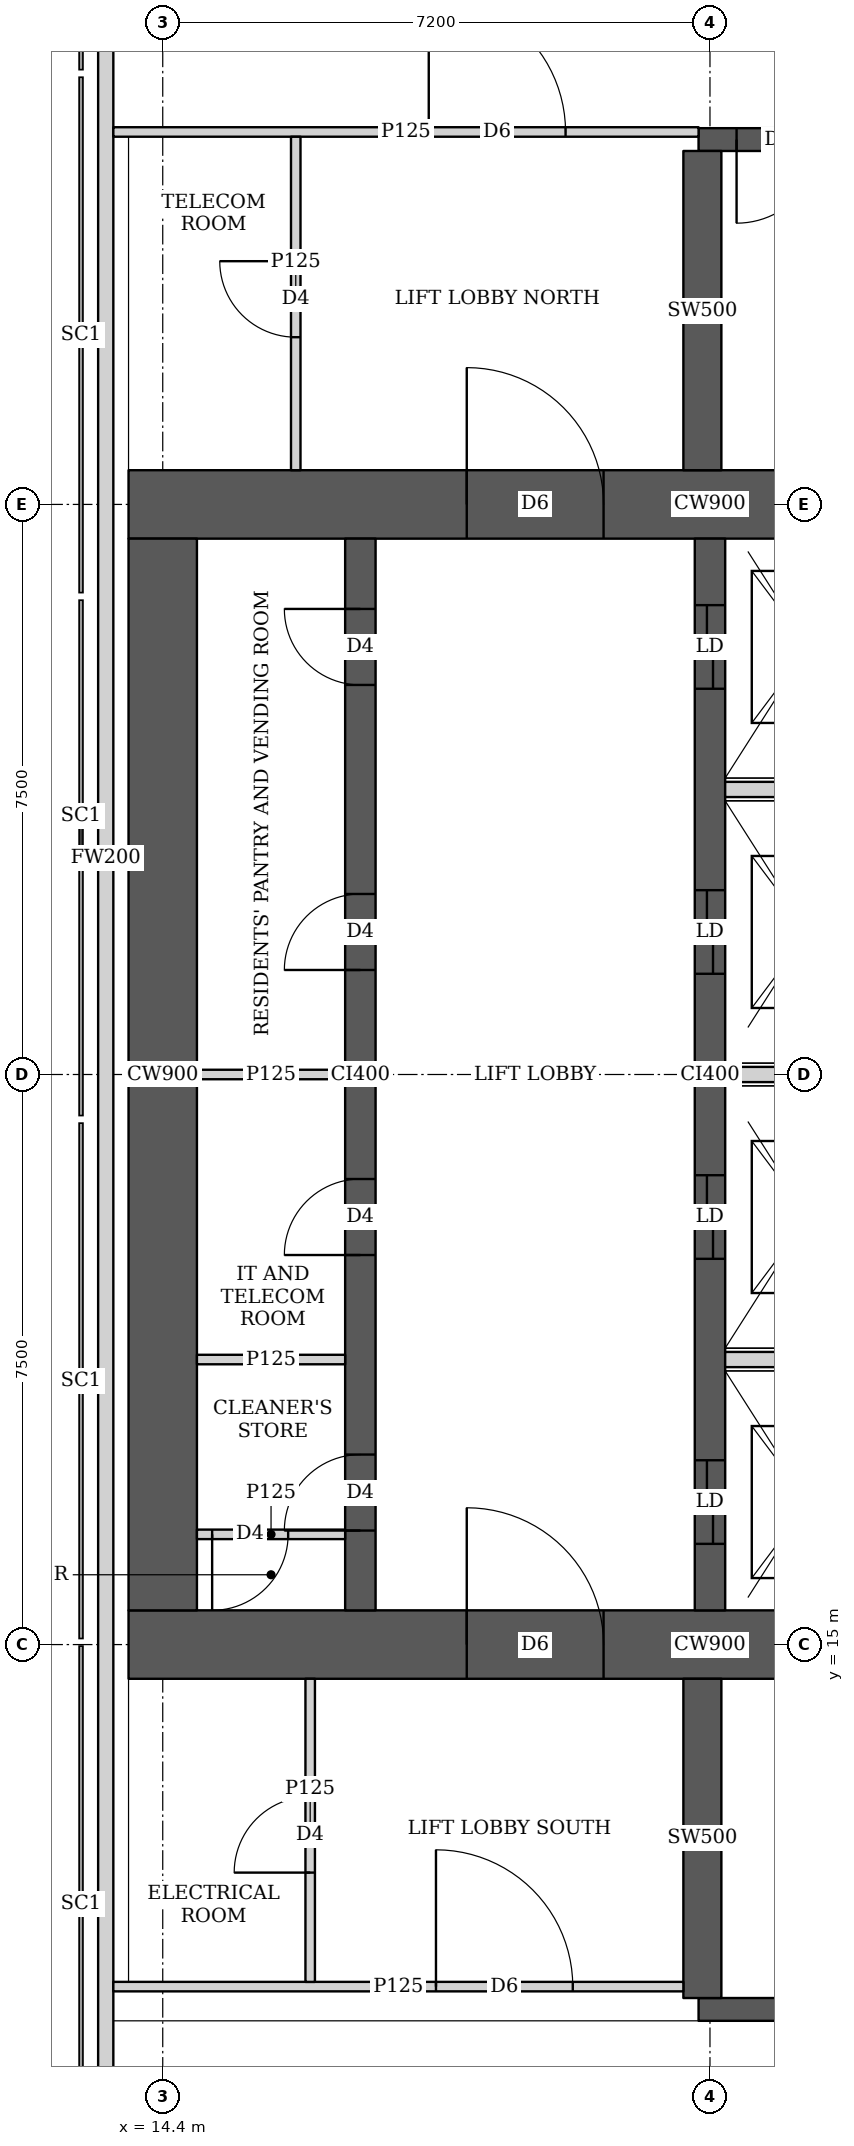
"""IFC4 building model, lengths in metres.
Left out: names, types, materials, properties, quantities, classifications, styles, units other than length and angle.
Written with IfcOpenShell. Run it as: python <this file> out.ifc"""

import sys

from ifc_helpers import new_model, si_unit, direction, frame, frame_2d, origin, place, context, subcontext, project, spatial, rectangle, extrude, element, fill, save


model = new_model("IFC4")
c1 = context("Model", 3, precision=1e-05, world=origin(), true_north=direction((0.0, 1.0)))
c2 = subcontext(c1, "Body", "Model", "MODEL_VIEW")
j1 = project(units=[si_unit("LENGTHUNIT", "METRE"), si_unit("PLANEANGLEUNIT", "RADIAN")], contexts=[c1])
p1 = place(None, origin())
s1 = spatial("IfcSite", under=j1, at=p1, CompositionType="ELEMENT")
p2 = place(p1, origin())
s2 = spatial("IfcBuilding", under=s1, at=p2, CompositionType="ELEMENT")
p3 = place(p2, frame((0.0, 0.0, 251.6)))
s3 = spatial("IfcBuildingStorey", under=s2, at=p3, CompositionType="ELEMENT", Elevation=251.6)
p4 = place(p3, frame((13.95, 15.0, 0.0), z_axis=(0.0, 0.0, 1.0), x_axis=(1.0, 0.0, 0.0)))
e1 = element("IfcWall", 1, at=p4, inside=s3, PredefinedType="SHEAR", context=c2, shape_type="SweptSolid", body=[
    extrude(rectangle(XDim=15.3, YDim=0.9, at=frame_2d((7.65, 0.0))), origin(), (0.0, 0.0, 1.0), 3.75),
])
p5 = place(p4, frame((4.45, 0.0, 0.0)))
e2 = element("IfcOpeningElement", 2, at=p5, cuts=e1, PredefinedType="OPENING", context=c2, shape_type="SweptSolid", body=[
    extrude(rectangle(XDim=1.8, YDim=2.1, at=frame_2d((0.9, 1.05))), frame((0.0, 0.46, 0.0), z_axis=(0.0, -1.0, 0.0), x_axis=(1.0, 0.0, 0.0)), (0.0, 0.0, 1.0), 0.92),
])
p6 = place(p4, frame((10.7, 0.0, 0.0)))
e3 = element("IfcOpeningElement", 3, at=p6, cuts=e1, PredefinedType="OPENING", context=c2, shape_type="SweptSolid", body=[
    extrude(rectangle(XDim=1.1, YDim=2.1, at=frame_2d((0.55, 1.05))), frame((0.0, 0.46, 0.0), z_axis=(0.0, -1.0, 0.0), x_axis=(1.0, 0.0, 0.0)), (0.0, 0.0, 1.0), 0.92),
])
p7 = place(p3, frame((13.95, 30.0, 0.0), z_axis=(0.0, 0.0, 1.0), x_axis=(1.0, 0.0, 0.0)))
e4 = element("IfcWall", 4, at=p7, inside=s3, PredefinedType="SHEAR", context=c2, shape_type="SweptSolid", body=[
    extrude(rectangle(XDim=15.3, YDim=0.9, at=frame_2d((7.65, 0.0))), origin(), (0.0, 0.0, 1.0), 3.75),
])
p8 = place(p7, frame((4.45, 0.0, 0.0)))
e5 = element("IfcOpeningElement", 5, at=p8, cuts=e4, PredefinedType="OPENING", context=c2, shape_type="SweptSolid", body=[
    extrude(rectangle(XDim=1.8, YDim=2.1, at=frame_2d((0.9, 1.05))), frame((0.0, 0.46, 0.0), z_axis=(0.0, -1.0, 0.0), x_axis=(1.0, 0.0, 0.0)), (0.0, 0.0, 1.0), 0.92),
])
p9 = place(p7, frame((10.7, 0.0, 0.0)))
e6 = element("IfcOpeningElement", 6, at=p9, cuts=e4, PredefinedType="OPENING", context=c2, shape_type="SweptSolid", body=[
    extrude(rectangle(XDim=1.1, YDim=2.1, at=frame_2d((0.55, 1.05))), frame((0.0, 0.46, 0.0), z_axis=(0.0, -1.0, 0.0), x_axis=(1.0, 0.0, 0.0)), (0.0, 0.0, 1.0), 0.92),
])
p10 = place(p3, frame((14.4, 15.45, 0.0), z_axis=(0.0, 0.0, 1.0), x_axis=(0.0, 1.0, 0.0)))
e7 = element("IfcWall", 7, at=p10, inside=s3, PredefinedType="SHEAR", context=c2, shape_type="SweptSolid", body=[
    extrude(rectangle(XDim=14.1, YDim=0.9, at=frame_2d((7.05, 0.0))), origin(), (0.0, 0.0, 1.0), 3.75),
])
p11 = place(p3, frame((17.0, 15.45, 0.0), z_axis=(0.0, 0.0, 1.0), x_axis=(0.0, 1.0, 0.0)))
e8 = element("IfcWall", 8, at=p11, inside=s3, PredefinedType="SHEAR", context=c2, shape_type="SweptSolid", body=[
    extrude(rectangle(XDim=14.1, YDim=0.4, at=frame_2d((7.05, 0.0))), origin(), (0.0, 0.0, 1.0), 3.75),
])
p12 = place(p11, frame((1.05, 0.0, 0.0)))
e9 = element("IfcOpeningElement", 9, at=p12, cuts=e8, PredefinedType="OPENING", context=c2, shape_type="SweptSolid", body=[
    extrude(rectangle(XDim=1.0, YDim=2.1, at=frame_2d((0.5, 1.05))), frame((0.0, 0.21, 0.0), z_axis=(0.0, -1.0, 0.0), x_axis=(1.0, 0.0, 0.0)), (0.0, 0.0, 1.0), 0.42),
])
p13 = place(p11, frame((4.675, 0.0, 0.0)))
e10 = element("IfcOpeningElement", 10, at=p13, cuts=e8, PredefinedType="OPENING", context=c2, shape_type="SweptSolid", body=[
    extrude(rectangle(XDim=1.0, YDim=2.1, at=frame_2d((0.5, 1.05))), frame((0.0, 0.21, 0.0), z_axis=(0.0, -1.0, 0.0), x_axis=(1.0, 0.0, 0.0)), (0.0, 0.0, 1.0), 0.42),
])
p14 = place(p11, frame((8.425, 0.0, 0.0)))
e11 = element("IfcOpeningElement", 11, at=p14, cuts=e8, PredefinedType="OPENING", context=c2, shape_type="SweptSolid", body=[
    extrude(rectangle(XDim=1.0, YDim=2.1, at=frame_2d((0.5, 1.05))), frame((0.0, 0.21, 0.0), z_axis=(0.0, -1.0, 0.0), x_axis=(1.0, 0.0, 0.0)), (0.0, 0.0, 1.0), 0.42),
])
p15 = place(p11, frame((12.175, 0.0, 0.0)))
e12 = element("IfcOpeningElement", 12, at=p15, cuts=e8, PredefinedType="OPENING", context=c2, shape_type="SweptSolid", body=[
    extrude(rectangle(XDim=1.0, YDim=2.1, at=frame_2d((0.5, 1.05))), frame((0.0, 0.21, 0.0), z_axis=(0.0, -1.0, 0.0), x_axis=(1.0, 0.0, 0.0)), (0.0, 0.0, 1.0), 0.42),
])
p16 = place(p3, frame((21.6, 15.45, 0.0), z_axis=(0.0, 0.0, 1.0), x_axis=(0.0, 1.0, 0.0)))
e13 = element("IfcWall", 13, at=p16, inside=s3, PredefinedType="SHEAR", context=c2, shape_type="SweptSolid", body=[
    extrude(rectangle(XDim=14.1, YDim=0.4, at=frame_2d((7.05, 0.0))), origin(), (0.0, 0.0, 1.0), 3.75),
])
p17 = place(p16, frame((0.875, 0.0, 0.0)))
e14 = element("IfcOpeningElement", 14, at=p17, cuts=e13, PredefinedType="OPENING", context=c2, shape_type="SweptSolid", body=[
    extrude(rectangle(XDim=1.1, YDim=2.1, at=frame_2d((0.55, 1.05))), frame((0.0, 0.21, 0.0), z_axis=(0.0, -1.0, 0.0), x_axis=(1.0, 0.0, 0.0)), (0.0, 0.0, 1.0), 0.42),
])
p18 = place(p16, frame((4.625, 0.0, 0.0)))
e15 = element("IfcOpeningElement", 15, at=p18, cuts=e13, PredefinedType="OPENING", context=c2, shape_type="SweptSolid", body=[
    extrude(rectangle(XDim=1.1, YDim=2.1, at=frame_2d((0.55, 1.05))), frame((0.0, 0.21, 0.0), z_axis=(0.0, -1.0, 0.0), x_axis=(1.0, 0.0, 0.0)), (0.0, 0.0, 1.0), 0.42),
])
p19 = place(p16, frame((8.375, 0.0, 0.0)))
e16 = element("IfcOpeningElement", 16, at=p19, cuts=e13, PredefinedType="OPENING", context=c2, shape_type="SweptSolid", body=[
    extrude(rectangle(XDim=1.1, YDim=2.1, at=frame_2d((0.55, 1.05))), frame((0.0, 0.21, 0.0), z_axis=(0.0, -1.0, 0.0), x_axis=(1.0, 0.0, 0.0)), (0.0, 0.0, 1.0), 0.42),
])
p20 = place(p16, frame((12.125, 0.0, 0.0)))
e17 = element("IfcOpeningElement", 17, at=p20, cuts=e13, PredefinedType="OPENING", context=c2, shape_type="SweptSolid", body=[
    extrude(rectangle(XDim=1.1, YDim=2.1, at=frame_2d((0.55, 1.05))), frame((0.0, 0.21, 0.0), z_axis=(0.0, -1.0, 0.0), x_axis=(1.0, 0.0, 0.0)), (0.0, 0.0, 1.0), 0.42),
])
p21 = place(p3, frame((21.45, 10.2, 0.0), z_axis=(0.0, 0.0, 1.0), x_axis=(1.0, 0.0, 0.0)))
e18 = element("IfcWall", 18, at=p21, inside=s3, PredefinedType="SHEAR", context=c2, shape_type="SweptSolid", body=[
    extrude(rectangle(XDim=7.5, YDim=0.3, at=frame_2d((3.75, 0.0))), origin(), (0.0, 0.0, 1.0), 3.75),
])
p22 = place(p21, frame((1.2, 0.0, 0.0)))
e19 = element("IfcOpeningElement", 19, at=p22, cuts=e18, PredefinedType="OPENING", context=c2, shape_type="SweptSolid", body=[
    extrude(rectangle(XDim=1.1, YDim=2.1, at=frame_2d((0.55, 1.05))), frame((0.0, 0.16, 0.0), z_axis=(0.0, -1.0, 0.0), x_axis=(1.0, 0.0, 0.0)), (0.0, 0.0, 1.0), 0.32),
])
p23 = place(p3, frame((21.5, 10.35, 0.0), z_axis=(0.0, 0.0, 1.0), x_axis=(0.0, 1.0, 0.0)))
e20 = element("IfcWall", 20, at=p23, inside=s3, PredefinedType="SHEAR", context=c2, shape_type="SweptSolid", body=[
    extrude(rectangle(XDim=4.2, YDim=0.5, at=frame_2d((2.1, 0.0))), origin(), (0.0, 0.0, 1.0), 3.75),
])
p24 = place(p3, frame((21.45, 34.8, 0.0), z_axis=(0.0, 0.0, 1.0), x_axis=(1.0, 0.0, 0.0)))
e21 = element("IfcWall", 21, at=p24, inside=s3, PredefinedType="SHEAR", context=c2, shape_type="SweptSolid", body=[
    extrude(rectangle(XDim=7.5, YDim=0.3, at=frame_2d((3.75, 0.0))), origin(), (0.0, 0.0, 1.0), 3.75),
])
p25 = place(p24, frame((0.5, 0.0, 0.0)))
e22 = element("IfcOpeningElement", 22, at=p25, cuts=e21, PredefinedType="OPENING", context=c2, shape_type="SweptSolid", body=[
    extrude(rectangle(XDim=1.1, YDim=2.1, at=frame_2d((0.55, 1.05))), frame((0.0, 0.16, 0.0), z_axis=(0.0, -1.0, 0.0), x_axis=(1.0, 0.0, 0.0)), (0.0, 0.0, 1.0), 0.32),
])
p26 = place(p3, frame((21.5, 30.45, 0.0), z_axis=(0.0, 0.0, 1.0), x_axis=(0.0, 1.0, 0.0)))
e23 = element("IfcWall", 23, at=p26, inside=s3, PredefinedType="SHEAR", context=c2, shape_type="SweptSolid", body=[
    extrude(rectangle(XDim=4.2, YDim=0.5, at=frame_2d((2.1, 0.0))), origin(), (0.0, 0.0, 1.0), 3.75),
])
p27 = place(p3, frame((13.65, 43.037, 0.0), z_axis=(0.0, 0.0, 1.0), x_axis=(0.0, -1.0, 0.0)))
e24 = element("IfcWall", 24, at=p27, inside=s3, PredefinedType="SOLIDWALL", context=c2, shape_type="SweptSolid", body=[
    extrude(rectangle(XDim=35.374, YDim=0.2, at=frame_2d((17.687, 0.0))), origin(), (0.0, 0.0, 1.0), 3.5),
])
p28 = place(p27, frame((1.959, 0.0, 0.9)))
e25 = element("IfcOpeningElement", 25, at=p28, cuts=e24, PredefinedType="OPENING", context=c2, shape_type="SweptSolid", body=[
    extrude(rectangle(XDim=1.8, YDim=1.5, at=frame_2d((0.9, 0.75))), frame((0.0, 0.11, 0.0), z_axis=(0.0, -1.0, 0.0), x_axis=(1.0, 0.0, 0.0)), (0.0, 0.0, 1.0), 0.22),
])
p29 = place(p3, frame((13.75, 10.5, 0.0), z_axis=(0.0, 0.0, 1.0), x_axis=(1.0, 0.0, 0.0)))
e26 = element("IfcWall", 26, at=p29, inside=s3, PredefinedType="PARTITIONING", context=c2, shape_type="SweptSolid", body=[
    extrude(rectangle(XDim=7.5, YDim=0.125, at=frame_2d((3.75, 0.0))), origin(), (0.0, 0.0, 1.0), 3.5),
])
p30 = place(p29, frame((4.245, 0.0, 0.0)))
e27 = element("IfcOpeningElement", 27, at=p30, cuts=e26, PredefinedType="OPENING", context=c2, shape_type="SweptSolid", body=[
    extrude(rectangle(XDim=1.8, YDim=2.1, at=frame_2d((0.9, 1.05))), frame((0.0, 0.073, 0.0), z_axis=(0.0, -1.0, 0.0), x_axis=(1.0, 0.0, 0.0)), (0.0, 0.0, 1.0), 0.145),
])
p31 = place(p3, frame((13.75, 34.9, 0.0), z_axis=(0.0, 0.0, 1.0), x_axis=(1.0, 0.0, 0.0)))
e28 = element("IfcWall", 28, at=p31, inside=s3, PredefinedType="PARTITIONING", context=c2, shape_type="SweptSolid", body=[
    extrude(rectangle(XDim=7.7, YDim=0.125, at=frame_2d((3.85, 0.0))), origin(), (0.0, 0.0, 1.0), 3.5),
])
p32 = place(p31, frame((4.15, 0.0, 0.0)))
e29 = element("IfcOpeningElement", 29, at=p32, cuts=e28, PredefinedType="OPENING", context=c2, shape_type="SweptSolid", body=[
    extrude(rectangle(XDim=1.8, YDim=2.1, at=frame_2d((0.9, 1.05))), frame((0.0, 0.073, 0.0), z_axis=(0.0, -1.0, 0.0), x_axis=(1.0, 0.0, 0.0)), (0.0, 0.0, 1.0), 0.145),
])
p33 = place(p3, frame((16.34, 10.562, 0.0), z_axis=(0.0, 0.0, 1.0), x_axis=(0.0, 1.0, 0.0)))
e30 = element("IfcWall", 30, at=p33, inside=s3, PredefinedType="PARTITIONING", context=c2, shape_type="SweptSolid", body=[
    extrude(rectangle(XDim=3.988, YDim=0.125, at=frame_2d((1.994, 0.0))), origin(), (0.0, 0.0, 1.0), 3.5),
])
p34 = place(p33, frame((1.438, 0.0, 0.0)))
e31 = element("IfcOpeningElement", 31, at=p34, cuts=e30, PredefinedType="OPENING", context=c2, shape_type="SweptSolid", body=[
    extrude(rectangle(XDim=1.0, YDim=2.1, at=frame_2d((0.5, 1.05))), frame((0.0, 0.073, 0.0), z_axis=(0.0, -1.0, 0.0), x_axis=(1.0, 0.0, 0.0)), (0.0, 0.0, 1.0), 0.145),
])
p35 = place(p3, frame((16.15, 30.45, 0.0), z_axis=(0.0, 0.0, 1.0), x_axis=(0.0, 1.0, 0.0)))
e32 = element("IfcWall", 32, at=p35, inside=s3, PredefinedType="PARTITIONING", context=c2, shape_type="SweptSolid", body=[
    extrude(rectangle(XDim=4.387, YDim=0.125, at=frame_2d((2.193, 0.0))), origin(), (0.0, 0.0, 1.0), 3.5),
])
p36 = place(p35, frame((1.75, 0.0, 0.0)))
e33 = element("IfcOpeningElement", 33, at=p36, cuts=e32, PredefinedType="OPENING", context=c2, shape_type="SweptSolid", body=[
    extrude(rectangle(XDim=1.0, YDim=2.1, at=frame_2d((0.5, 1.05))), frame((0.0, 0.073, 0.0), z_axis=(0.0, -1.0, 0.0), x_axis=(1.0, 0.0, 0.0)), (0.0, 0.0, 1.0), 0.145),
])
p37 = place(p3, frame((14.85, 16.45, 0.0), z_axis=(0.0, 0.0, 1.0), x_axis=(1.0, 0.0, 0.0)))
e34 = element("IfcWall", 34, at=p37, inside=s3, PredefinedType="PARTITIONING", context=c2, shape_type="SweptSolid", body=[
    extrude(rectangle(XDim=1.95, YDim=0.125, at=frame_2d((0.975, 0.0))), origin(), (0.0, 0.0, 1.0), 3.5),
])
p38 = place(p37, frame((0.2, 0.0, 0.0)))
e35 = element("IfcOpeningElement", 35, at=p38, cuts=e34, PredefinedType="OPENING", context=c2, shape_type="SweptSolid", body=[
    extrude(rectangle(XDim=1.0, YDim=2.1, at=frame_2d((0.5, 1.05))), frame((0.0, 0.073, 0.0), z_axis=(0.0, -1.0, 0.0), x_axis=(1.0, 0.0, 0.0)), (0.0, 0.0, 1.0), 0.145),
])
for number, where, z_axis, x_axis in (
    (36, (14.85, 18.75, 0.0), (0.0, 0.0, 1.0), (1.0, 0.0, 0.0)),
    (37, (14.85, 22.5, 0.0), (0.0, 0.0, 1.0), (1.0, 0.0, 0.0)),
):
    element("IfcWall", number, at=place(p3, frame(where, z_axis=z_axis, x_axis=x_axis)), inside=s3, PredefinedType="PARTITIONING", context=c2, shape_type="SweptSolid", body=[
        extrude(rectangle(XDim=1.95, YDim=0.125, at=frame_2d((0.975, 0.0))), origin(), (0.0, 0.0, 1.0), 3.5),
    ])
for number, where, z_axis, x_axis in (
    (38, (21.8, 18.75, 0.0), (0.0, 0.0, 1.0), (1.0, 0.0, 0.0)),
    (39, (21.8, 22.5, 0.0), (0.0, 0.0, 1.0), (1.0, 0.0, 0.0)),
    (40, (21.8, 26.25, 0.0), (0.0, 0.0, 1.0), (1.0, 0.0, 0.0)),
):
    element("IfcWall", number, at=place(p3, frame(where, z_axis=z_axis, x_axis=x_axis)), inside=s3, PredefinedType="SOLIDWALL", context=c2, shape_type="SweptSolid", body=[
        extrude(rectangle(XDim=2.2, YDim=0.2, at=frame_2d((1.1, 0.0))), origin(), (0.0, 0.0, 1.0), 3.5),
    ])
p39 = place(p34, origin())
e41 = element("IfcDoor", 41, at=p39, inside=s3, OperationType="SINGLE_SWING_LEFT", PredefinedType="DOOR", context=c2, shape_type="SweptSolid", body=[
    extrude(rectangle(XDim=1.0, YDim=2.1, at=frame_2d((0.5, 1.05))), frame((0.0, 0.025, 0.0), z_axis=(0.0, -1.0, 0.0), x_axis=(1.0, 0.0, 0.0)), (0.0, 0.0, 1.0), 0.05),
])
fill(e31, e41)
p40 = place(p30, origin())
e42 = element("IfcDoor", 42, at=p40, inside=s3, OperationType="DOUBLE_DOOR_SINGLE_SWING", PredefinedType="DOOR", context=c2, shape_type="SweptSolid", body=[
    extrude(rectangle(XDim=1.8, YDim=2.1, at=frame_2d((0.9, 1.05))), frame((0.0, 0.025, 0.0), z_axis=(0.0, -1.0, 0.0), x_axis=(1.0, 0.0, 0.0)), (0.0, 0.0, 1.0), 0.05),
])
fill(e27, e42)
p41 = place(p36, origin())
e43 = element("IfcDoor", 43, at=p41, inside=s3, OperationType="SINGLE_SWING_RIGHT", PredefinedType="DOOR", context=c2, shape_type="SweptSolid", body=[
    extrude(rectangle(XDim=1.0, YDim=2.1, at=frame_2d((0.5, 1.05))), frame((0.0, 0.025, 0.0), z_axis=(0.0, -1.0, 0.0), x_axis=(1.0, 0.0, 0.0)), (0.0, 0.0, 1.0), 0.05),
])
fill(e33, e43)
p42 = place(p32, origin())
e44 = element("IfcDoor", 44, at=p42, inside=s3, OperationType="DOUBLE_DOOR_SINGLE_SWING", PredefinedType="DOOR", context=c2, shape_type="SweptSolid", body=[
    extrude(rectangle(XDim=1.8, YDim=2.1, at=frame_2d((0.9, 1.05))), frame((0.0, 0.025, 0.0), z_axis=(0.0, -1.0, 0.0), x_axis=(1.0, 0.0, 0.0)), (0.0, 0.0, 1.0), 0.05),
])
fill(e29, e44)
p43 = place(p38, origin())
e45 = element("IfcDoor", 45, at=p43, inside=s3, OperationType="SINGLE_SWING_RIGHT", PredefinedType="DOOR", context=c2, shape_type="SweptSolid", body=[
    extrude(rectangle(XDim=1.0, YDim=2.1, at=frame_2d((0.5, 1.05))), frame((0.0, 0.025, 0.0), z_axis=(0.0, -1.0, 0.0), x_axis=(1.0, 0.0, 0.0)), (0.0, 0.0, 1.0), 0.05),
])
fill(e35, e45)
p44 = place(p12, origin())
e46 = element("IfcDoor", 46, at=p44, inside=s3, OperationType="SINGLE_SWING_LEFT", PredefinedType="DOOR", context=c2, shape_type="SweptSolid", body=[
    extrude(rectangle(XDim=1.0, YDim=2.1, at=frame_2d((0.5, 1.05))), frame((0.0, 0.025, 0.0), z_axis=(0.0, -1.0, 0.0), x_axis=(1.0, 0.0, 0.0)), (0.0, 0.0, 1.0), 0.05),
])
fill(e9, e46)
p45 = place(p13, origin())
e47 = element("IfcDoor", 47, at=p45, inside=s3, OperationType="SINGLE_SWING_LEFT", PredefinedType="DOOR", context=c2, shape_type="SweptSolid", body=[
    extrude(rectangle(XDim=1.0, YDim=2.1, at=frame_2d((0.5, 1.05))), frame((0.0, 0.025, 0.0), z_axis=(0.0, -1.0, 0.0), x_axis=(1.0, 0.0, 0.0)), (0.0, 0.0, 1.0), 0.05),
])
fill(e10, e47)
p46 = place(p14, origin())
e48 = element("IfcDoor", 48, at=p46, inside=s3, OperationType="SINGLE_SWING_LEFT", PredefinedType="DOOR", context=c2, shape_type="SweptSolid", body=[
    extrude(rectangle(XDim=1.0, YDim=2.1, at=frame_2d((0.5, 1.05))), frame((0.0, 0.025, 0.0), z_axis=(0.0, -1.0, 0.0), x_axis=(1.0, 0.0, 0.0)), (0.0, 0.0, 1.0), 0.05),
])
fill(e11, e48)
p47 = place(p15, origin())
e49 = element("IfcDoor", 49, at=p47, inside=s3, OperationType="SINGLE_SWING_RIGHT", PredefinedType="DOOR", context=c2, shape_type="SweptSolid", body=[
    extrude(rectangle(XDim=1.0, YDim=2.1, at=frame_2d((0.5, 1.05))), frame((0.0, 0.025, 0.0), z_axis=(0.0, -1.0, 0.0), x_axis=(1.0, 0.0, 0.0)), (0.0, 0.0, 1.0), 0.05),
])
fill(e12, e49)
p48 = place(p5, origin())
e50 = element("IfcDoor", 50, at=p48, inside=s3, OperationType="DOUBLE_DOOR_SINGLE_SWING", PredefinedType="DOOR", context=c2, shape_type="SweptSolid", body=[
    extrude(rectangle(XDim=1.8, YDim=2.1, at=frame_2d((0.9, 1.05))), frame((0.0, 0.025, 0.0), z_axis=(0.0, -1.0, 0.0), x_axis=(1.0, 0.0, 0.0)), (0.0, 0.0, 1.0), 0.05),
])
fill(e2, e50)
p49 = place(p8, origin())
e51 = element("IfcDoor", 51, at=p49, inside=s3, OperationType="DOUBLE_DOOR_SINGLE_SWING", PredefinedType="DOOR", context=c2, shape_type="SweptSolid", body=[
    extrude(rectangle(XDim=1.8, YDim=2.1, at=frame_2d((0.9, 1.05))), frame((0.0, 0.025, 0.0), z_axis=(0.0, -1.0, 0.0), x_axis=(1.0, 0.0, 0.0)), (0.0, 0.0, 1.0), 0.05),
])
fill(e5, e51)
p50 = place(p17, origin())
e52 = element("IfcDoor", 52, at=p50, inside=s3, OperationType="DOUBLE_DOOR_SLIDING", PredefinedType="DOOR", context=c2, shape_type="SweptSolid", body=[
    extrude(rectangle(XDim=1.1, YDim=2.1, at=frame_2d((0.55, 1.05))), frame((0.0, 0.025, 0.0), z_axis=(0.0, -1.0, 0.0), x_axis=(1.0, 0.0, 0.0)), (0.0, 0.0, 1.0), 0.05),
])
fill(e14, e52)
p51 = place(p18, origin())
e53 = element("IfcDoor", 53, at=p51, inside=s3, OperationType="DOUBLE_DOOR_SLIDING", PredefinedType="DOOR", context=c2, shape_type="SweptSolid", body=[
    extrude(rectangle(XDim=1.1, YDim=2.1, at=frame_2d((0.55, 1.05))), frame((0.0, 0.025, 0.0), z_axis=(0.0, -1.0, 0.0), x_axis=(1.0, 0.0, 0.0)), (0.0, 0.0, 1.0), 0.05),
])
fill(e15, e53)
p52 = place(p19, origin())
e54 = element("IfcDoor", 54, at=p52, inside=s3, OperationType="DOUBLE_DOOR_SLIDING", PredefinedType="DOOR", context=c2, shape_type="SweptSolid", body=[
    extrude(rectangle(XDim=1.1, YDim=2.1, at=frame_2d((0.55, 1.05))), frame((0.0, 0.025, 0.0), z_axis=(0.0, -1.0, 0.0), x_axis=(1.0, 0.0, 0.0)), (0.0, 0.0, 1.0), 0.05),
])
fill(e16, e54)
p53 = place(p20, origin())
e55 = element("IfcDoor", 55, at=p53, inside=s3, OperationType="DOUBLE_DOOR_SLIDING", PredefinedType="DOOR", context=c2, shape_type="SweptSolid", body=[
    extrude(rectangle(XDim=1.1, YDim=2.1, at=frame_2d((0.55, 1.05))), frame((0.0, 0.025, 0.0), z_axis=(0.0, -1.0, 0.0), x_axis=(1.0, 0.0, 0.0)), (0.0, 0.0, 1.0), 0.05),
])
fill(e17, e55)
p54 = place(p25, origin())
e56 = element("IfcDoor", 56, at=p54, inside=s3, OperationType="SINGLE_SWING_RIGHT", PredefinedType="DOOR", context=c2, shape_type="SweptSolid", body=[
    extrude(rectangle(XDim=1.1, YDim=2.1, at=frame_2d((0.55, 1.05))), frame((0.0, 0.025, 0.0), z_axis=(0.0, -1.0, 0.0), x_axis=(1.0, 0.0, 0.0)), (0.0, 0.0, 1.0), 0.05),
])
fill(e22, e56)
save(model, sys.argv[1])
